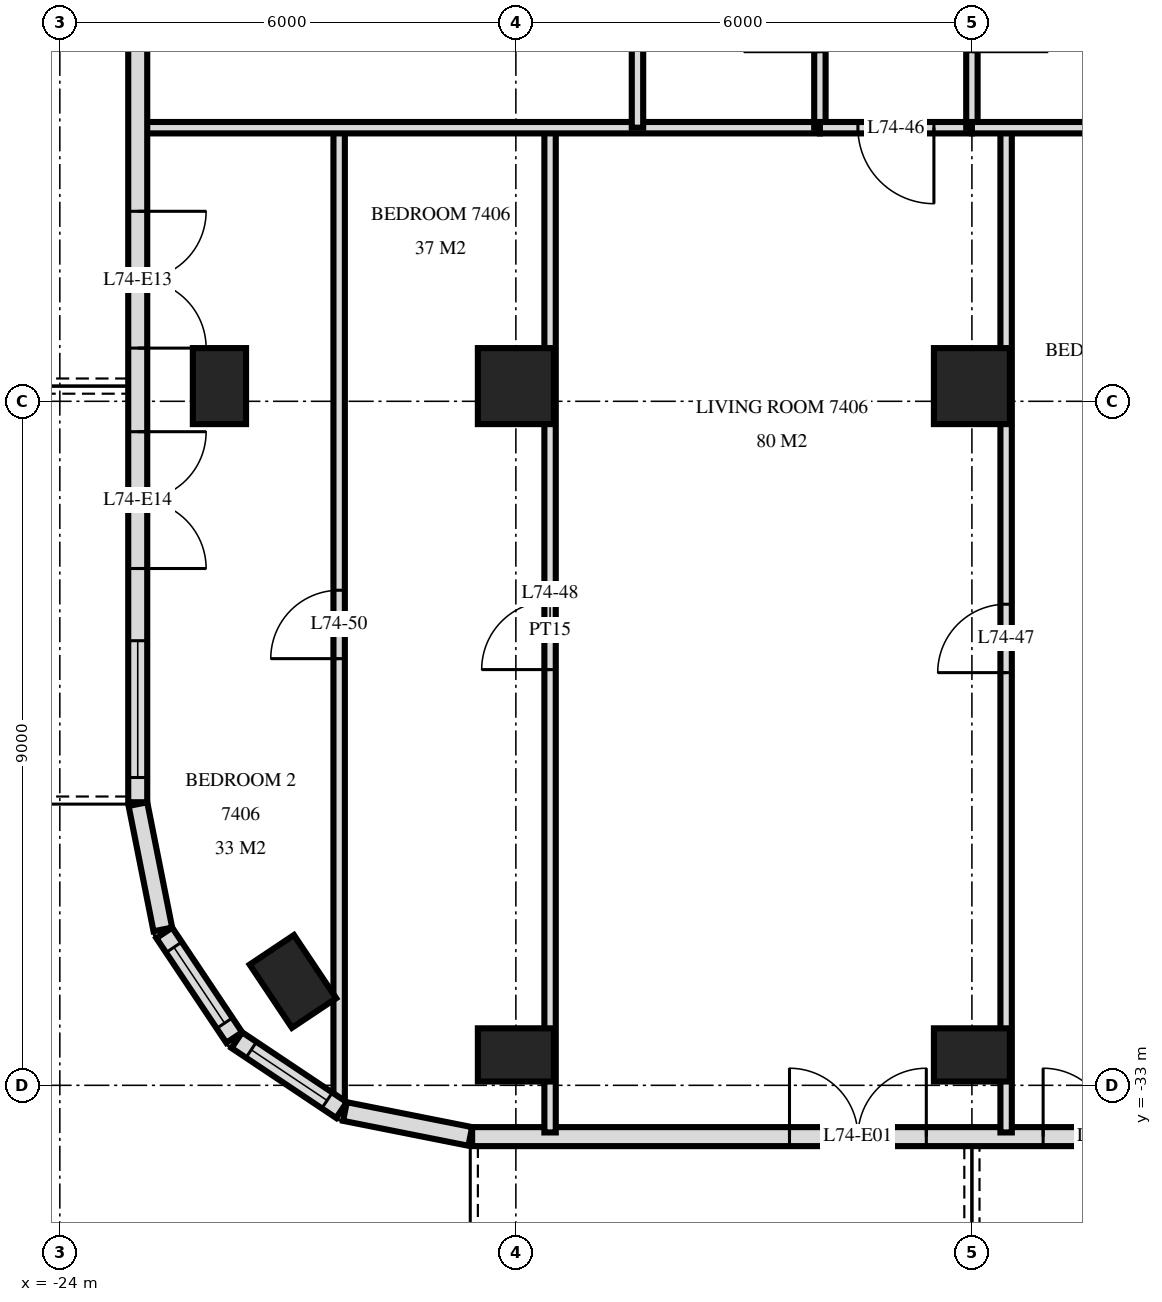
"""IFC4 building model, lengths in metres.
Left out: names, types, materials, properties, quantities, classifications, styles, units other than length and angle.
Written with IfcOpenShell. Run it as: python <this file> out.ifc"""

import sys

from ifc_helpers import new_model, si_unit, direction, frame, frame_2d, origin, origin_2d, place, context, subcontext, project, spatial, rectangle, extrude, element, fill, save


model = new_model("IFC4")
c1 = context("Model", 3, precision=1e-05, world=origin(), true_north=direction((0.0, 1.0)))
c2 = subcontext(c1, "Body", "Model", "MODEL_VIEW")
j1 = project(units=[si_unit("LENGTHUNIT", "METRE"), si_unit("PLANEANGLEUNIT", "RADIAN")], contexts=[c1])
p1 = place(None, origin())
s1 = spatial("IfcSite", under=j1, at=p1, CompositionType="ELEMENT")
p2 = place(p1, origin())
s2 = spatial("IfcBuilding", under=s1, at=p2, CompositionType="ELEMENT")
p3 = place(p2, frame((0.0, 0.0, 280.6)))
s3 = spatial("IfcBuildingStorey", under=s2, at=p3, CompositionType="ELEMENT", Elevation=280.6)
for number, where, z_axis, x_axis in (
    (1, (-21.9, -23.8, 0.0), (0.0, 0.0, 1.0), (0.0, 1.0, 0.0)),
    (2, (-20.933, -31.633, 0.0), (0.0, 0.0, 1.0), (-0.556, 0.831, 0.0)),
    (3, (-18.0, -32.6, 0.0), (0.0, 0.0, 1.0), (1.0, 0.0, 0.0)),
):
    element("IfcColumn", number, at=place(p3, frame(where, z_axis=z_axis, x_axis=x_axis)), inside=s3, PredefinedType="COLUMN", context=c2, shape_type="SweptSolid", body=[
        extrude(rectangle(XDim=1.0, YDim=0.7, at=origin_2d()), origin(), (0.0, 0.0, 1.0), 3.5),
    ])
p4 = place(p3, frame((-18.0, -23.8, 0.0), z_axis=(0.0, 0.0, 1.0), x_axis=(1.0, 0.0, 0.0)))
e4 = element("IfcColumn", 4, at=p4, inside=s3, PredefinedType="COLUMN", context=c2, shape_type="SweptSolid", body=[
    extrude(rectangle(XDim=1.0, YDim=1.0, at=origin_2d()), origin(), (0.0, 0.0, 1.0), 3.5),
])
p5 = place(p3, frame((-12.0, -32.6, 0.0), z_axis=(0.0, 0.0, 1.0), x_axis=(1.0, 0.0, 0.0)))
e5 = element("IfcColumn", 5, at=p5, inside=s3, PredefinedType="COLUMN", context=c2, shape_type="SweptSolid", body=[
    extrude(rectangle(XDim=1.0, YDim=0.7, at=origin_2d()), origin(), (0.0, 0.0, 1.0), 3.5),
])
p6 = place(p3, frame((-12.0, -23.8, 0.0), z_axis=(0.0, 0.0, 1.0), x_axis=(1.0, 0.0, 0.0)))
e6 = element("IfcColumn", 6, at=p6, inside=s3, PredefinedType="COLUMN", context=c2, shape_type="SweptSolid", body=[
    extrude(rectangle(XDim=1.0, YDim=1.0, at=origin_2d()), origin(), (0.0, 0.0, 1.0), 3.5),
])
p7 = place(p3, frame((-22.975, -3.325, 0.0), z_axis=(0.0, 0.0, 1.0), x_axis=(0.0, -1.0, 0.0)))
e7 = element("IfcWall", 7, at=p7, inside=s3, PredefinedType="SOLIDWALL", context=c2, shape_type="SweptSolid", body=[
    extrude(rectangle(XDim=25.951, YDim=0.25, at=frame_2d((12.975, 0.0))), origin(), (0.0, 0.0, 1.0), 3.22),
])
p8 = place(p7, frame((3.225, 0.0, 0.0)))
e8 = element("IfcOpeningElement", 8, at=p8, cuts=e7, PredefinedType="OPENING", context=c2, shape_type="SweptSolid", body=[
    extrude(rectangle(XDim=1.8, YDim=2.4, at=frame_2d((0.9, 1.2))), frame((0.0, 0.135, 0.0), z_axis=(0.0, -1.0, 0.0), x_axis=(1.0, 0.0, 0.0)), (0.0, 0.0, 1.0), 0.27),
])
p9 = place(p7, frame((7.975, 0.0, 0.0)))
e9 = element("IfcOpeningElement", 9, at=p9, cuts=e7, PredefinedType="OPENING", context=c2, shape_type="SweptSolid", body=[
    extrude(rectangle(XDim=1.8, YDim=2.4, at=frame_2d((0.9, 1.2))), frame((0.0, 0.135, 0.0), z_axis=(0.0, -1.0, 0.0), x_axis=(1.0, 0.0, 0.0)), (0.0, 0.0, 1.0), 0.27),
])
p10 = place(p7, frame((12.275, 0.0, 0.9)))
e10 = element("IfcOpeningElement", 10, at=p10, cuts=e7, PredefinedType="OPENING", context=c2, shape_type="SweptSolid", body=[
    extrude(rectangle(XDim=1.2, YDim=1.5, at=frame_2d((0.6, 0.75))), frame((0.0, 0.135, 0.0), z_axis=(0.0, -1.0, 0.0), x_axis=(1.0, 0.0, 0.0)), (0.0, 0.0, 1.0), 0.27),
])
p11 = place(p7, frame((18.175, 0.0, 0.0)))
e11 = element("IfcOpeningElement", 11, at=p11, cuts=e7, PredefinedType="OPENING", context=c2, shape_type="SweptSolid", body=[
    extrude(rectangle(XDim=1.8, YDim=2.4, at=frame_2d((0.9, 1.2))), frame((0.0, 0.135, 0.0), z_axis=(0.0, -1.0, 0.0), x_axis=(1.0, 0.0, 0.0)), (0.0, 0.0, 1.0), 0.27),
])
p12 = place(p7, frame((21.075, 0.0, 0.0)))
e12 = element("IfcOpeningElement", 12, at=p12, cuts=e7, PredefinedType="OPENING", context=c2, shape_type="SweptSolid", body=[
    extrude(rectangle(XDim=1.8, YDim=2.4, at=frame_2d((0.9, 1.2))), frame((0.0, 0.135, 0.0), z_axis=(0.0, -1.0, 0.0), x_axis=(1.0, 0.0, 0.0)), (0.0, 0.0, 1.0), 0.27),
])
p13 = place(p7, frame((23.825, 0.0, 0.9)))
e13 = element("IfcOpeningElement", 13, at=p13, cuts=e7, PredefinedType="OPENING", context=c2, shape_type="SweptSolid", body=[
    extrude(rectangle(XDim=1.8, YDim=1.5, at=frame_2d((0.9, 0.75))), frame((0.0, 0.135, 0.0), z_axis=(0.0, -1.0, 0.0), x_axis=(1.0, 0.0, 0.0)), (0.0, 0.0, 1.0), 0.27),
])
p14 = place(p3, frame((-22.973, -29.3, 0.0), z_axis=(0.0, 0.0, 1.0), x_axis=(0.19513878023, -0.980775640221, 0.0)))
e14 = element("IfcWall", 14, at=p14, inside=s3, PredefinedType="SOLIDWALL", context=c2, shape_type="SweptSolid", body=[
    extrude(rectangle(XDim=1.681, YDim=0.25, at=frame_2d((0.841, 0.0))), origin(), (0.0, 0.0, 1.0), 3.22),
])
p15 = place(p3, frame((-22.626, -30.994, 0.0), z_axis=(0.0, 0.0, 1.0), x_axis=(0.55555029066, -0.831482937015, 0.0)))
e15 = element("IfcWall", 15, at=p15, inside=s3, PredefinedType="SOLIDWALL", context=c2, shape_type="SweptSolid", body=[
    extrude(rectangle(XDim=1.656, YDim=0.25, at=frame_2d((0.828, 0.0))), origin(), (0.0, 0.0, 1.0), 3.22),
])
p16 = place(p15, frame((0.228, 0.0, 0.9)))
e16 = element("IfcOpeningElement", 16, at=p16, cuts=e15, PredefinedType="OPENING", context=c2, shape_type="SweptSolid", body=[
    extrude(rectangle(XDim=1.2, YDim=1.5, at=frame_2d((0.6, 0.75))), frame((0.0, 0.135, 0.0), z_axis=(0.0, -1.0, 0.0), x_axis=(1.0, 0.0, 0.0)), (0.0, 0.0, 1.0), 0.27),
])
p17 = place(p3, frame((-21.671, -32.406, 0.0), z_axis=(0.0, 0.0, 1.0), x_axis=(0.831482937015, -0.55555029066, 0.0)))
e17 = element("IfcWall", 17, at=p17, inside=s3, PredefinedType="SOLIDWALL", context=c2, shape_type="SweptSolid", body=[
    extrude(rectangle(XDim=1.656, YDim=0.25, at=frame_2d((0.828, 0.0))), origin(), (0.0, 0.0, 1.0), 3.22),
])
p18 = place(p17, frame((0.228, 0.0, 0.9)))
e18 = element("IfcOpeningElement", 18, at=p18, cuts=e17, PredefinedType="OPENING", context=c2, shape_type="SweptSolid", body=[
    extrude(rectangle(XDim=1.2, YDim=1.5, at=frame_2d((0.6, 0.75))), frame((0.0, 0.135, 0.0), z_axis=(0.0, -1.0, 0.0), x_axis=(1.0, 0.0, 0.0)), (0.0, 0.0, 1.0), 0.27),
])
p19 = place(p3, frame((-20.249, -33.344, 0.0), z_axis=(0.0, 0.0, 1.0), x_axis=(0.980770110232, -0.195166572128, 0.0)))
e19 = element("IfcWall", 19, at=p19, inside=s3, PredefinedType="SOLIDWALL", context=c2, shape_type="SweptSolid", body=[
    extrude(rectangle(XDim=1.681, YDim=0.25, at=frame_2d((0.841, 0.0))), origin(), (0.0, 0.0, 1.0), 3.22),
])
p20 = place(p3, frame((-18.575, -33.675, 0.0), z_axis=(0.0, 0.0, 1.0), x_axis=(1.0, 0.0, 0.0)))
e20 = element("IfcWall", 20, at=p20, inside=s3, PredefinedType="SOLIDWALL", context=c2, shape_type="SweptSolid", body=[
    extrude(rectangle(XDim=37.151, YDim=0.25, at=frame_2d((18.575, 0.0))), origin(), (0.0, 0.0, 1.0), 3.22),
])
p21 = place(p20, frame((4.175, 0.0, 0.0)))
e21 = element("IfcOpeningElement", 21, at=p21, cuts=e20, PredefinedType="OPENING", context=c2, shape_type="SweptSolid", body=[
    extrude(rectangle(XDim=1.8, YDim=2.4, at=frame_2d((0.9, 1.2))), frame((0.0, 0.135, 0.0), z_axis=(0.0, -1.0, 0.0), x_axis=(1.0, 0.0, 0.0)), (0.0, 0.0, 1.0), 0.27),
])
p22 = place(p20, frame((7.512, 0.0, 0.0)))
e22 = element("IfcOpeningElement", 22, at=p22, cuts=e20, PredefinedType="OPENING", context=c2, shape_type="SweptSolid", body=[
    extrude(rectangle(XDim=1.8, YDim=2.4, at=frame_2d((0.9, 1.2))), frame((0.0, 0.135, 0.0), z_axis=(0.0, -1.0, 0.0), x_axis=(1.0, 0.0, 0.0)), (0.0, 0.0, 1.0), 0.27),
])
p23 = place(p20, frame((10.287, 0.0, 0.9)))
e23 = element("IfcOpeningElement", 23, at=p23, cuts=e20, PredefinedType="OPENING", context=c2, shape_type="SweptSolid", body=[
    extrude(rectangle(XDim=1.8, YDim=1.5, at=frame_2d((0.9, 0.75))), frame((0.0, 0.135, 0.0), z_axis=(0.0, -1.0, 0.0), x_axis=(1.0, 0.0, 0.0)), (0.0, 0.0, 1.0), 0.27),
])
p24 = place(p20, frame((12.875, 0.0, 0.9)))
e24 = element("IfcOpeningElement", 24, at=p24, cuts=e20, PredefinedType="OPENING", context=c2, shape_type="SweptSolid", body=[
    extrude(rectangle(XDim=2.4, YDim=1.5, at=frame_2d((1.2, 0.75))), frame((0.0, 0.135, 0.0), z_axis=(0.0, -1.0, 0.0), x_axis=(1.0, 0.0, 0.0)), (0.0, 0.0, 1.0), 0.27),
])
p25 = place(p20, frame((16.175, 0.0, 0.0)))
e25 = element("IfcOpeningElement", 25, at=p25, cuts=e20, PredefinedType="OPENING", context=c2, shape_type="SweptSolid", body=[
    extrude(rectangle(XDim=1.8, YDim=2.4, at=frame_2d((0.9, 1.2))), frame((0.0, 0.135, 0.0), z_axis=(0.0, -1.0, 0.0), x_axis=(1.0, 0.0, 0.0)), (0.0, 0.0, 1.0), 0.27),
])
p26 = place(p20, frame((19.175, 0.0, 0.0)))
e26 = element("IfcOpeningElement", 26, at=p26, cuts=e20, PredefinedType="OPENING", context=c2, shape_type="SweptSolid", body=[
    extrude(rectangle(XDim=1.8, YDim=2.4, at=frame_2d((0.9, 1.2))), frame((0.0, 0.135, 0.0), z_axis=(0.0, -1.0, 0.0), x_axis=(1.0, 0.0, 0.0)), (0.0, 0.0, 1.0), 0.27),
])
p27 = place(p20, frame((21.875, 0.0, 0.9)))
e27 = element("IfcOpeningElement", 27, at=p27, cuts=e20, PredefinedType="OPENING", context=c2, shape_type="SweptSolid", body=[
    extrude(rectangle(XDim=2.4, YDim=1.5, at=frame_2d((1.2, 0.75))), frame((0.0, 0.135, 0.0), z_axis=(0.0, -1.0, 0.0), x_axis=(1.0, 0.0, 0.0)), (0.0, 0.0, 1.0), 0.27),
])
p28 = place(p20, frame((25.175, 0.0, 0.0)))
e28 = element("IfcOpeningElement", 28, at=p28, cuts=e20, PredefinedType="OPENING", context=c2, shape_type="SweptSolid", body=[
    extrude(rectangle(XDim=1.8, YDim=2.4, at=frame_2d((0.9, 1.2))), frame((0.0, 0.135, 0.0), z_axis=(0.0, -1.0, 0.0), x_axis=(1.0, 0.0, 0.0)), (0.0, 0.0, 1.0), 0.27),
])
p29 = place(p20, frame((27.875, 0.0, 0.9)))
e29 = element("IfcOpeningElement", 29, at=p29, cuts=e20, PredefinedType="OPENING", context=c2, shape_type="SweptSolid", body=[
    extrude(rectangle(XDim=2.4, YDim=1.5, at=frame_2d((1.2, 0.75))), frame((0.0, 0.135, 0.0), z_axis=(0.0, -1.0, 0.0), x_axis=(1.0, 0.0, 0.0)), (0.0, 0.0, 1.0), 0.27),
])
p30 = place(p20, frame((30.95, 0.0, 0.9)))
e30 = element("IfcOpeningElement", 30, at=p30, cuts=e20, PredefinedType="OPENING", context=c2, shape_type="SweptSolid", body=[
    extrude(rectangle(XDim=1.8, YDim=1.5, at=frame_2d((0.9, 0.75))), frame((0.0, 0.135, 0.0), z_axis=(0.0, -1.0, 0.0), x_axis=(1.0, 0.0, 0.0)), (0.0, 0.0, 1.0), 0.27),
])
p31 = place(p20, frame((34.175, 0.0, 0.0)))
e31 = element("IfcOpeningElement", 31, at=p31, cuts=e20, PredefinedType="OPENING", context=c2, shape_type="SweptSolid", body=[
    extrude(rectangle(XDim=1.8, YDim=2.4, at=frame_2d((0.9, 1.2))), frame((0.0, 0.135, 0.0), z_axis=(0.0, -1.0, 0.0), x_axis=(1.0, 0.0, 0.0)), (0.0, 0.0, 1.0), 0.27),
])
p32 = place(p3, frame((-11.55, -33.62, 0.0), z_axis=(0.0, 0.0, 1.0), x_axis=(0.0, 1.0, 0.0)))
e32 = element("IfcWall", 32, at=p32, inside=s3, PredefinedType="PARTITIONING", context=c2, shape_type="SweptSolid", body=[
    extrude(rectangle(XDim=13.22, YDim=0.15, at=frame_2d((6.61, 0.0))), origin(), (0.0, 0.0, 1.0), 3.22),
])
p33 = place(p32, frame((6.05, 0.0, 0.0)))
e33 = element("IfcOpeningElement", 33, at=p33, cuts=e32, PredefinedType="OPENING", context=c2, shape_type="SweptSolid", body=[
    extrude(rectangle(XDim=0.9, YDim=2.1, at=frame_2d((0.45, 1.05))), frame((0.0, 0.085, 0.0), z_axis=(0.0, -1.0, 0.0), x_axis=(1.0, 0.0, 0.0)), (0.0, 0.0, 1.0), 0.17),
])
p34 = place(p3, frame((-12.0, -20.4, 0.0), z_axis=(0.0, 0.0, 1.0), x_axis=(0.0, 1.0, 0.0)))
e34 = element("IfcWall", 34, at=p34, inside=s3, PredefinedType="PARTITIONING", context=c2, shape_type="SweptSolid", body=[
    extrude(rectangle(XDim=3.0, YDim=0.15, at=frame_2d((1.5, 0.0))), origin(), (0.0, 0.0, 1.0), 3.22),
])
p35 = place(p34, frame((1.0, 0.0, 0.0)))
e35 = element("IfcOpeningElement", 35, at=p35, cuts=e34, PredefinedType="OPENING", context=c2, shape_type="SweptSolid", body=[
    extrude(rectangle(XDim=1.0, YDim=2.1, at=frame_2d((0.5, 1.05))), frame((0.0, 0.085, 0.0), z_axis=(0.0, -1.0, 0.0), x_axis=(1.0, 0.0, 0.0)), (0.0, 0.0, 1.0), 0.17),
])
p36 = place(p3, frame((-14.0, -20.4, 0.0), z_axis=(0.0, 0.0, 1.0), x_axis=(0.0, 1.0, 0.0)))
e36 = element("IfcWall", 36, at=p36, inside=s3, PredefinedType="PARTITIONING", context=c2, shape_type="SweptSolid", body=[
    extrude(rectangle(XDim=3.0, YDim=0.15, at=frame_2d((1.5, 0.0))), origin(), (0.0, 0.0, 1.0), 3.22),
])
p37 = place(p36, frame((1.0, 0.0, 0.0)))
e37 = element("IfcOpeningElement", 37, at=p37, cuts=e36, PredefinedType="OPENING", context=c2, shape_type="SweptSolid", body=[
    extrude(rectangle(XDim=1.0, YDim=2.1, at=frame_2d((0.5, 1.05))), frame((0.0, 0.085, 0.0), z_axis=(0.0, -1.0, 0.0), x_axis=(1.0, 0.0, 0.0)), (0.0, 0.0, 1.0), 0.17),
])
p38 = place(p3, frame((-16.4, -20.4, 0.0), z_axis=(0.0, 0.0, 1.0), x_axis=(0.0, 1.0, 0.0)))
e38 = element("IfcWall", 38, at=p38, inside=s3, PredefinedType="PARTITIONING", context=c2, shape_type="SweptSolid", body=[
    extrude(rectangle(XDim=3.0, YDim=0.15, at=frame_2d((1.5, 0.0))), origin(), (0.0, 0.0, 1.0), 3.22),
])
p39 = place(p3, frame((-17.55, -33.62, 0.0), z_axis=(0.0, 0.0, 1.0), x_axis=(0.0, 1.0, 0.0)))
e39 = element("IfcWall", 39, at=p39, inside=s3, PredefinedType="PARTITIONING", context=c2, shape_type="SweptSolid", body=[
    extrude(rectangle(XDim=13.22, YDim=0.15, at=frame_2d((6.61, 0.0))), origin(), (0.0, 0.0, 1.0), 3.22),
])
p40 = place(p39, frame((6.09, 0.0, 0.0)))
e40 = element("IfcOpeningElement", 40, at=p40, cuts=e39, PredefinedType="OPENING", context=c2, shape_type="SweptSolid", body=[
    extrude(rectangle(XDim=0.9, YDim=2.1, at=frame_2d((0.45, 1.05))), frame((0.0, 0.085, 0.0), z_axis=(0.0, -1.0, 0.0), x_axis=(1.0, 0.0, 0.0)), (0.0, 0.0, 1.0), 0.17),
])
p41 = place(p3, frame((-20.325, -33.239, 0.0), z_axis=(0.0, 0.0, 1.0), x_axis=(0.0, 1.0, 0.0)))
e41 = element("IfcWall", 41, at=p41, inside=s3, PredefinedType="PARTITIONING", context=c2, shape_type="SweptSolid", body=[
    extrude(rectangle(XDim=12.839, YDim=0.15, at=frame_2d((6.419, 0.0))), origin(), (0.0, 0.0, 1.0), 3.22),
])
p42 = place(p41, frame((5.853, 0.0, 0.0)))
e42 = element("IfcOpeningElement", 42, at=p42, cuts=e41, PredefinedType="OPENING", context=c2, shape_type="SweptSolid", body=[
    extrude(rectangle(XDim=0.9, YDim=2.1, at=frame_2d((0.45, 1.05))), frame((0.0, 0.085, 0.0), z_axis=(0.0, -1.0, 0.0), x_axis=(1.0, 0.0, 0.0)), (0.0, 0.0, 1.0), 0.17),
])
p43 = place(p3, frame((-14.0, -20.4, 0.0), z_axis=(0.0, 0.0, 1.0), x_axis=(1.0, 0.0, 0.0)))
e43 = element("IfcWall", 43, at=p43, inside=s3, PredefinedType="PARTITIONING", context=c2, shape_type="SweptSolid", body=[
    extrude(rectangle(XDim=2.0, YDim=0.15, at=frame_2d((1.0, 0.0))), origin(), (0.0, 0.0, 1.0), 3.22),
])
p44 = place(p43, frame((0.5, 0.0, 0.0)))
e44 = element("IfcOpeningElement", 44, at=p44, cuts=e43, PredefinedType="OPENING", context=c2, shape_type="SweptSolid", body=[
    extrude(rectangle(XDim=1.0, YDim=2.1, at=frame_2d((0.5, 1.05))), frame((0.0, 0.085, 0.0), z_axis=(0.0, -1.0, 0.0), x_axis=(1.0, 0.0, 0.0)), (0.0, 0.0, 1.0), 0.17),
])
p45 = place(p3, frame((-22.92, -20.4, 0.0), z_axis=(0.0, 0.0, 1.0), x_axis=(1.0, 0.0, 0.0)))
e45 = element("IfcWall", 45, at=p45, inside=s3, PredefinedType="PARTITIONING", context=c2, shape_type="SweptSolid", body=[
    extrude(rectangle(XDim=8.92, YDim=0.15, at=frame_2d((4.46, 0.0))), origin(), (0.0, 0.0, 1.0), 3.22),
])
p46 = place(p3, frame((-12.0, -20.4, 0.0), z_axis=(0.0, 0.0, 1.0), x_axis=(1.0, 0.0, 0.0)))
e46 = element("IfcWall", 46, at=p46, inside=s3, PredefinedType="PARTITIONING", context=c2, shape_type="SweptSolid", body=[
    extrude(rectangle(XDim=6.0, YDim=0.15, at=frame_2d((3.0, 0.0))), origin(), (0.0, 0.0, 1.0), 3.22),
])
p47 = place(p46, frame((4.4, 0.0, 0.0)))
e47 = element("IfcOpeningElement", 47, at=p47, cuts=e46, PredefinedType="OPENING", context=c2, shape_type="SweptSolid", body=[
    extrude(rectangle(XDim=0.8, YDim=2.1, at=frame_2d((0.4, 1.05))), frame((0.0, 0.085, 0.0), z_axis=(0.0, -1.0, 0.0), x_axis=(1.0, 0.0, 0.0)), (0.0, 0.0, 1.0), 0.17),
])
p48 = place(p16, origin())
e48 = element("IfcWindow", 48, at=p48, inside=s3, PartitioningType="SINGLE_PANEL", PredefinedType="WINDOW", context=c2, shape_type="SweptSolid", body=[
    extrude(rectangle(XDim=1.2, YDim=1.5, at=frame_2d((0.6, 0.75))), frame((0.0, 0.03, 0.0), z_axis=(0.0, -1.0, 0.0), x_axis=(1.0, 0.0, 0.0)), (0.0, 0.0, 1.0), 0.06),
])
fill(e16, e48)
p49 = place(p18, origin())
e49 = element("IfcWindow", 49, at=p49, inside=s3, PartitioningType="SINGLE_PANEL", PredefinedType="WINDOW", context=c2, shape_type="SweptSolid", body=[
    extrude(rectangle(XDim=1.2, YDim=1.5, at=frame_2d((0.6, 0.75))), frame((0.0, 0.03, 0.0), z_axis=(0.0, -1.0, 0.0), x_axis=(1.0, 0.0, 0.0)), (0.0, 0.0, 1.0), 0.06),
])
fill(e18, e49)
p50 = place(p21, origin())
e50 = element("IfcDoor", 50, at=p50, inside=s3, OperationType="DOUBLE_DOOR_SINGLE_SWING", PredefinedType="DOOR", context=c2, shape_type="SweptSolid", body=[
    extrude(rectangle(XDim=1.8, YDim=2.4, at=frame_2d((0.9, 1.2))), frame((0.0, 0.025, 0.0), z_axis=(0.0, -1.0, 0.0), x_axis=(1.0, 0.0, 0.0)), (0.0, 0.0, 1.0), 0.05),
])
fill(e21, e50)
p51 = place(p22, origin())
e51 = element("IfcDoor", 51, at=p51, inside=s3, OperationType="DOUBLE_DOOR_SINGLE_SWING", PredefinedType="DOOR", context=c2, shape_type="SweptSolid", body=[
    extrude(rectangle(XDim=1.8, YDim=2.4, at=frame_2d((0.9, 1.2))), frame((0.0, 0.025, 0.0), z_axis=(0.0, -1.0, 0.0), x_axis=(1.0, 0.0, 0.0)), (0.0, 0.0, 1.0), 0.05),
])
fill(e22, e51)
p52 = place(p11, origin())
e52 = element("IfcDoor", 52, at=p52, inside=s3, OperationType="DOUBLE_DOOR_SINGLE_SWING", PredefinedType="DOOR", context=c2, shape_type="SweptSolid", body=[
    extrude(rectangle(XDim=1.8, YDim=2.4, at=frame_2d((0.9, 1.2))), frame((0.0, 0.025, 0.0), z_axis=(0.0, -1.0, 0.0), x_axis=(1.0, 0.0, 0.0)), (0.0, 0.0, 1.0), 0.05),
])
fill(e11, e52)
p53 = place(p12, origin())
e53 = element("IfcDoor", 53, at=p53, inside=s3, OperationType="DOUBLE_DOOR_SINGLE_SWING", PredefinedType="DOOR", context=c2, shape_type="SweptSolid", body=[
    extrude(rectangle(XDim=1.8, YDim=2.4, at=frame_2d((0.9, 1.2))), frame((0.0, 0.025, 0.0), z_axis=(0.0, -1.0, 0.0), x_axis=(1.0, 0.0, 0.0)), (0.0, 0.0, 1.0), 0.05),
])
fill(e12, e53)
p54 = place(p13, origin())
e54 = element("IfcWindow", 54, at=p54, inside=s3, PartitioningType="SINGLE_PANEL", PredefinedType="WINDOW", context=c2, shape_type="SweptSolid", body=[
    extrude(rectangle(XDim=1.8, YDim=1.5, at=frame_2d((0.9, 0.75))), frame((0.0, 0.03, 0.0), z_axis=(0.0, -1.0, 0.0), x_axis=(1.0, 0.0, 0.0)), (0.0, 0.0, 1.0), 0.06),
])
fill(e13, e54)
p55 = place(p44, frame((0.5, 0.0, 0.0), z_axis=(0.0, 0.0, 1.0), x_axis=(-1.0, 0.0, 0.0)))
e55 = element("IfcDoor", 55, at=p55, inside=s3, OperationType="SINGLE_SWING_RIGHT", PredefinedType="DOOR", context=c2, shape_type="SweptSolid", body=[
    extrude(rectangle(XDim=1.0, YDim=2.1, at=frame_2d((0.0, 1.05))), frame((0.0, -0.025, 0.0), z_axis=(0.0, 1.0, 0.0), x_axis=(-1.0, 0.0, 0.0)), (0.0, 0.0, 1.0), 0.05),
])
fill(e44, e55)
p56 = place(p33, origin())
e56 = element("IfcDoor", 56, at=p56, inside=s3, OperationType="SINGLE_SWING_RIGHT", PredefinedType="DOOR", context=c2, shape_type="SweptSolid", body=[
    extrude(rectangle(XDim=0.9, YDim=2.1, at=frame_2d((0.45, 1.05))), frame((0.0, 0.025, 0.0), z_axis=(0.0, -1.0, 0.0), x_axis=(1.0, 0.0, 0.0)), (0.0, 0.0, 1.0), 0.05),
])
fill(e33, e56)
p57 = place(p40, origin())
e57 = element("IfcDoor", 57, at=p57, inside=s3, OperationType="SINGLE_SWING_RIGHT", PredefinedType="DOOR", context=c2, shape_type="SweptSolid", body=[
    extrude(rectangle(XDim=0.9, YDim=2.1, at=frame_2d((0.45, 1.05))), frame((0.0, 0.025, 0.0), z_axis=(0.0, -1.0, 0.0), x_axis=(1.0, 0.0, 0.0)), (0.0, 0.0, 1.0), 0.05),
])
fill(e40, e57)
p58 = place(p42, origin())
e58 = element("IfcDoor", 58, at=p58, inside=s3, OperationType="SINGLE_SWING_RIGHT", PredefinedType="DOOR", context=c2, shape_type="SweptSolid", body=[
    extrude(rectangle(XDim=0.9, YDim=2.1, at=frame_2d((0.45, 1.05))), frame((0.0, 0.025, 0.0), z_axis=(0.0, -1.0, 0.0), x_axis=(1.0, 0.0, 0.0)), (0.0, 0.0, 1.0), 0.05),
])
fill(e42, e58)
save(model, sys.argv[1])
